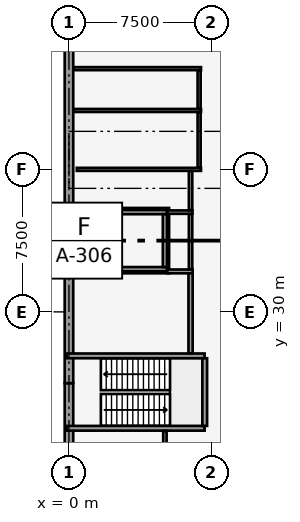
"""IFC4 building model, lengths in metres.
Left out: names, types, materials, properties, quantities, classifications, styles, units other than length and angle.
Written with IfcOpenShell. Run it as: python <this file> out.ifc"""

import sys

from ifc_helpers import new_model, si_unit, direction, frame, frame_2d, origin, origin_2d, place, context, subcontext, project, spatial, rectangle, extrude, element, fill, save


model = new_model("IFC4")
c1 = context("Model", 3, precision=1e-05, world=origin(), true_north=direction((0.0, 1.0)))
c2 = subcontext(c1, "Body", "Model", "MODEL_VIEW")
j1 = project(units=[si_unit("LENGTHUNIT", "METRE"), si_unit("PLANEANGLEUNIT", "RADIAN")], contexts=[c1])
p1 = place(None, origin())
s1 = spatial("IfcSite", under=j1, at=p1, CompositionType="ELEMENT")
p2 = place(p1, origin())
s2 = spatial("IfcBuilding", under=s1, at=p2, CompositionType="ELEMENT")
p3 = place(p2, frame((0.0, 0.0, -4.8)))
s3 = spatial("IfcBuildingStorey", under=s2, at=p3, CompositionType="ELEMENT", Elevation=-4.8)
for number, where, z_axis, x_axis in (
    (1, (0.0, 30.0, 0.0), (0.0, 0.0, 1.0), (1.0, 0.0, 0.0)),
    (2, (0.0, 37.5, 0.0), (0.0, 0.0, 1.0), (1.0, 0.0, 0.0)),
    (3, (7.5, 30.0, 0.0), (0.0, 0.0, 1.0), (1.0, 0.0, 0.0)),
    (4, (7.5, 37.5, 0.0), (0.0, 0.0, 1.0), (1.0, 0.0, 0.0)),
):
    element("IfcColumn", number, at=place(p3, frame(where, z_axis=z_axis, x_axis=x_axis)), inside=s3, PredefinedType="COLUMN", context=c2, shape_type="SweptSolid", body=[
        extrude(rectangle(XDim=0.8, YDim=0.8, at=origin_2d()), origin(), (0.0, 0.0, 1.0), 4.8),
    ])
for number, where, z_axis, x_axis in (
    (5, (0.0, 0.0, 0.0), (0.0, 0.0, 1.0), (0.0, 1.0, 0.0)),
    (6, (0.0, 26.25, 0.0), (0.0, 0.0, 1.0), (0.0, 1.0, 0.0)),
):
    element("IfcWall", number, at=place(p3, frame(where, z_axis=z_axis, x_axis=x_axis)), inside=s3, PredefinedType="USERDEFINED", context=c2, shape_type="SweptSolid", body=[
        extrude(rectangle(XDim=26.25, YDim=0.45, at=frame_2d((13.125, 0.0))), origin(), (0.0, 0.0, 1.0), 4.5),
    ])
p4 = place(p3, frame((-0.12, 23.875, 0.0), z_axis=(0.0, 0.0, 1.0), x_axis=(1.0, 0.0, 0.0)))
e7 = element("IfcWall", 7, at=p4, inside=s3, PredefinedType="SOLIDWALL", context=c2, shape_type="SweptSolid", body=[
    extrude(rectangle(XDim=7.26, YDim=0.25, at=frame_2d((3.63, 0.0))), origin(), (0.0, 0.0, 1.0), 4.5),
])
p5 = place(p3, frame((-0.12, 27.685, 0.0), z_axis=(0.0, 0.0, 1.0), x_axis=(1.0, 0.0, 0.0)))
e8 = element("IfcWall", 8, at=p5, inside=s3, PredefinedType="SOLIDWALL", context=c2, shape_type="SweptSolid", body=[
    extrude(rectangle(XDim=7.26, YDim=0.25, at=frame_2d((3.63, 0.0))), origin(), (0.0, 0.0, 1.0), 4.5),
])
p6 = place(p5, frame((0.45, 0.0, 0.0)))
e9 = element("IfcOpeningElement", 9, at=p6, cuts=e8, PredefinedType="OPENING", context=c2, shape_type="SweptSolid", body=[
    extrude(rectangle(XDim=1.1, YDim=2.15, at=frame_2d((0.55, 1.075))), frame((0.0, 0.135, 0.0), z_axis=(0.0, -1.0, 0.0), x_axis=(1.0, 0.0, 0.0)), (0.0, 0.0, 1.0), 0.27),
])
p7 = place(p3, frame((7.145, 24.0, 0.0), z_axis=(0.0, 0.0, 1.0), x_axis=(0.0, 1.0, 0.0)))
e10 = element("IfcWall", 10, at=p7, inside=s3, PredefinedType="SOLIDWALL", context=c2, shape_type="SweptSolid", body=[
    extrude(rectangle(XDim=3.56, YDim=0.25, at=frame_2d((1.78, 0.0))), origin(), (0.0, 0.0, 1.0), 4.5),
])
p8 = place(p3, frame((2.34, 32.25, 0.0), z_axis=(0.0, 0.0, 1.0), x_axis=(1.0, 0.0, 0.0)))
e11 = element("IfcWall", 11, at=p8, inside=s3, PredefinedType="SOLIDWALL", context=c2, shape_type="SweptSolid", body=[
    extrude(rectangle(XDim=2.82, YDim=0.22, at=frame_2d((1.41, 0.0))), origin(), (0.0, 0.0, 1.0), 4.5),
])
p9 = place(p8, frame((0.86, 0.0, 0.0)))
e12 = element("IfcOpeningElement", 12, at=p9, cuts=e11, PredefinedType="OPENING", context=c2, shape_type="SweptSolid", body=[
    extrude(rectangle(XDim=1.1, YDim=2.15, at=frame_2d((0.55, 1.075))), frame((0.0, 0.12, 0.0), z_axis=(0.0, -1.0, 0.0), x_axis=(1.0, 0.0, 0.0)), (0.0, 0.0, 1.0), 0.24),
])
p10 = place(p3, frame((2.34, 35.25, 0.0), z_axis=(0.0, 0.0, 1.0), x_axis=(1.0, 0.0, 0.0)))
e13 = element("IfcWall", 13, at=p10, inside=s3, PredefinedType="SOLIDWALL", context=c2, shape_type="SweptSolid", body=[
    extrude(rectangle(XDim=2.82, YDim=0.22, at=frame_2d((1.41, 0.0))), origin(), (0.0, 0.0, 1.0), 4.5),
])
for number, where, z_axis, x_axis in (
    (14, (2.45, 32.36, 0.0), (0.0, 0.0, 1.0), (0.0, 1.0, 0.0)),
    (15, (5.05, 32.36, 0.0), (0.0, 0.0, 1.0), (0.0, 1.0, 0.0)),
):
    element("IfcWall", number, at=place(p3, frame(where, z_axis=z_axis, x_axis=x_axis)), inside=s3, PredefinedType="SOLIDWALL", context=c2, shape_type="SweptSolid", body=[
        extrude(rectangle(XDim=2.78, YDim=0.22, at=frame_2d((1.39, 0.0))), origin(), (0.0, 0.0, 1.0), 4.5),
    ])
p11 = place(p3, frame((6.4, 27.82, 0.0), z_axis=(0.0, 0.0, 1.0), x_axis=(0.0, 1.0, 0.0)))
e16 = element("IfcWall", 16, at=p11, inside=s3, PredefinedType="SOLIDWALL", context=c2, shape_type="SweptSolid", body=[
    extrude(rectangle(XDim=4.31, YDim=0.22, at=frame_2d((2.155, 0.0))), origin(), (0.0, 0.0, 1.0), 4.5),
])
p12 = place(p11, frame((0.45, 0.0, 0.0)))
e17 = element("IfcOpeningElement", 17, at=p12, cuts=e16, PredefinedType="OPENING", context=c2, shape_type="SweptSolid", body=[
    extrude(rectangle(XDim=1.1, YDim=2.15, at=frame_2d((0.55, 1.075))), frame((0.0, 0.12, 0.0), z_axis=(0.0, -1.0, 0.0), x_axis=(1.0, 0.0, 0.0)), (0.0, 0.0, 1.0), 0.24),
])
p13 = place(p3, frame((0.24, 32.13, 0.0), z_axis=(0.0, 0.0, 1.0), x_axis=(1.0, 0.0, 0.0)))
e18 = element("IfcWall", 18, at=p13, inside=s3, PredefinedType="PARTITIONING", context=c2, shape_type="SweptSolid", body=[
    extrude(rectangle(XDim=2.085, YDim=0.2, at=frame_2d((1.042, 0.0))), origin(), (0.0, 0.0, 1.0), 4.48),
])
p14 = place(p3, frame((5.175, 32.13, 0.0), z_axis=(0.0, 0.0, 1.0), x_axis=(1.0, 0.0, 0.0)))
e19 = element("IfcWall", 19, at=p14, inside=s3, PredefinedType="PARTITIONING", context=c2, shape_type="SweptSolid", body=[
    extrude(rectangle(XDim=1.335, YDim=0.2, at=frame_2d((0.667, 0.0))), origin(), (0.0, 0.0, 1.0), 4.48),
])
p15 = place(p3, frame((5.05, 20.274, 0.0), z_axis=(0.0, 0.0, 1.0), x_axis=(0.0, 1.0, 0.0)))
e20 = element("IfcWall", 20, at=p15, inside=s3, PredefinedType="PARTITIONING", context=c2, shape_type="SweptSolid", body=[
    extrude(rectangle(XDim=3.462, YDim=0.18, at=frame_2d((1.731, 0.0))), origin(), (0.0, 0.0, 1.0), 3.67),
])
p16 = place(p3, frame((0.239, 35.25, 0.0), z_axis=(0.0, 0.0, 1.0), x_axis=(1.0, 0.0, 0.0)))
e21 = element("IfcWall", 21, at=p16, inside=s3, PredefinedType="PARTITIONING", context=c2, shape_type="SweptSolid", body=[
    extrude(rectangle(XDim=2.101, YDim=0.18, at=frame_2d((1.051, 0.0))), origin(), (0.0, 0.0, 1.0), 3.87),
])
p17 = place(p3, frame((5.16, 35.25, 0.0), z_axis=(0.0, 0.0, 1.0), x_axis=(1.0, 0.0, 0.0)))
e22 = element("IfcWall", 22, at=p17, inside=s3, PredefinedType="PARTITIONING", context=c2, shape_type="SweptSolid", body=[
    extrude(rectangle(XDim=1.34, YDim=0.18, at=frame_2d((0.67, 0.0))), origin(), (0.0, 0.0, 1.0), 3.87),
])
p18 = place(p3, frame((0.414, 37.5, 0.0), z_axis=(0.0, 0.0, 1.0), x_axis=(1.0, 0.0, 0.0)))
e23 = element("IfcWall", 23, at=p18, inside=s3, PredefinedType="PARTITIONING", context=c2, shape_type="SweptSolid", body=[
    extrude(rectangle(XDim=6.536, YDim=0.16, at=frame_2d((3.268, 0.0))), origin(), (0.0, 0.0, 1.0), 3.42),
])
p19 = place(p3, frame((6.4, 32.244, 0.0), z_axis=(0.0, 0.0, 1.0), x_axis=(0.0, 1.0, 0.0)))
e24 = element("IfcWall", 24, at=p19, inside=s3, PredefinedType="PARTITIONING", context=c2, shape_type="SweptSolid", body=[
    extrude(rectangle(XDim=2.902, YDim=0.18, at=frame_2d((1.451, 0.0))), origin(), (0.0, 0.0, 1.0), 3.87),
])
p20 = place(p3, frame((6.4, 35.354, 0.0), z_axis=(0.0, 0.0, 1.0), x_axis=(0.0, 1.0, 0.0)))
e25 = element("IfcWall", 25, at=p20, inside=s3, PredefinedType="PARTITIONING", context=c2, shape_type="SweptSolid", body=[
    extrude(rectangle(XDim=2.052, YDim=0.18, at=frame_2d((1.026, 0.0))), origin(), (0.0, 0.0, 1.0), 3.67),
])
p21 = place(p20, frame((0.546, 0.0, 0.0)))
e26 = element("IfcOpeningElement", 26, at=p21, cuts=e25, PredefinedType="OPENING", context=c2, shape_type="SweptSolid", body=[
    extrude(rectangle(XDim=0.9, YDim=2.1, at=frame_2d((0.45, 1.05))), frame((0.0, 0.1, 0.0), z_axis=(0.0, -1.0, 0.0), x_axis=(1.0, 0.0, 0.0)), (0.0, 0.0, 1.0), 0.2),
])
for number, where, z_axis, x_axis in (
    (27, (0.239, 40.6, 0.0), (0.0, 0.0, 1.0), (1.0, 0.0, 0.0)),
    (28, (0.239, 42.8, 0.0), (0.0, 0.0, 1.0), (1.0, 0.0, 0.0)),
):
    element("IfcWall", number, at=place(p3, frame(where, z_axis=z_axis, x_axis=x_axis)), inside=s3, PredefinedType="PARTITIONING", context=c2, shape_type="SweptSolid", body=[
        extrude(rectangle(XDim=6.711, YDim=0.16, at=frame_2d((3.355, 0.0))), origin(), (0.0, 0.0, 1.0), 3.87),
    ])
p22 = place(p3, frame((6.85, 37.594, 0.0), z_axis=(0.0, 0.0, 1.0), x_axis=(0.0, 1.0, 0.0)))
e29 = element("IfcWall", 29, at=p22, inside=s3, PredefinedType="PARTITIONING", context=c2, shape_type="SweptSolid", body=[
    extrude(rectangle(XDim=2.912, YDim=0.16, at=frame_2d((1.456, 0.0))), origin(), (0.0, 0.0, 1.0), 3.42),
])
p23 = place(p22, frame((0.981, 0.0, 0.0)))
e30 = element("IfcOpeningElement", 30, at=p23, cuts=e29, PredefinedType="OPENING", context=c2, shape_type="SweptSolid", body=[
    extrude(rectangle(XDim=0.95, YDim=2.1, at=frame_2d((0.475, 1.05))), frame((0.0, 0.09, 0.0), z_axis=(0.0, -1.0, 0.0), x_axis=(1.0, 0.0, 0.0)), (0.0, 0.0, 1.0), 0.18),
])
p24 = place(p3, frame((6.85, 40.694, 0.0), z_axis=(0.0, 0.0, 1.0), x_axis=(0.0, 1.0, 0.0)))
e31 = element("IfcWall", 31, at=p24, inside=s3, PredefinedType="PARTITIONING", context=c2, shape_type="SweptSolid", body=[
    extrude(rectangle(XDim=2.012, YDim=0.16, at=frame_2d((1.006, 0.0))), origin(), (0.0, 0.0, 1.0), 3.87),
])
p25 = place(p24, frame((0.556, 0.0, 0.0)))
e32 = element("IfcOpeningElement", 32, at=p25, cuts=e31, PredefinedType="OPENING", context=c2, shape_type="SweptSolid", body=[
    extrude(rectangle(XDim=0.9, YDim=2.1, at=frame_2d((0.45, 1.05))), frame((0.0, 0.09, 0.0), z_axis=(0.0, -1.0, 0.0), x_axis=(1.0, 0.0, 0.0)), (0.0, 0.0, 1.0), 0.18),
])
p26 = place(p6, origin())
e33 = element("IfcDoor", 33, at=p26, inside=s3, OperationType="SINGLE_SWING_LEFT", PredefinedType="DOOR", context=c2, shape_type="SweptSolid", body=[
    extrude(rectangle(XDim=1.1, YDim=2.15, at=frame_2d((0.55, 1.075))), frame((0.0, 0.025, 0.0), z_axis=(0.0, -1.0, 0.0), x_axis=(1.0, 0.0, 0.0)), (0.0, 0.0, 1.0), 0.05),
])
fill(e9, e33)
p27 = place(p9, origin())
e34 = element("IfcDoor", 34, at=p27, inside=s3, OperationType="SLIDING_TO_LEFT", PredefinedType="DOOR", context=c2, shape_type="SweptSolid", body=[
    extrude(rectangle(XDim=1.1, YDim=2.15, at=frame_2d((0.55, 1.075))), frame((0.0, 0.025, 0.0), z_axis=(0.0, -1.0, 0.0), x_axis=(1.0, 0.0, 0.0)), (0.0, 0.0, 1.0), 0.05),
])
fill(e12, e34)
p28 = place(p12, origin())
e35 = element("IfcDoor", 35, at=p28, inside=s3, OperationType="SINGLE_SWING_LEFT", PredefinedType="DOOR", context=c2, shape_type="SweptSolid", body=[
    extrude(rectangle(XDim=1.1, YDim=2.15, at=frame_2d((0.55, 1.075))), frame((0.0, 0.025, 0.0), z_axis=(0.0, -1.0, 0.0), x_axis=(1.0, 0.0, 0.0)), (0.0, 0.0, 1.0), 0.05),
])
fill(e17, e35)
p29 = place(p21, origin())
e36 = element("IfcDoor", 36, at=p29, inside=s3, OperationType="SINGLE_SWING_RIGHT", PredefinedType="DOOR", context=c2, shape_type="SweptSolid", body=[
    extrude(rectangle(XDim=0.9, YDim=2.1, at=frame_2d((0.45, 1.05))), frame((0.0, 0.025, 0.0), z_axis=(0.0, -1.0, 0.0), x_axis=(1.0, 0.0, 0.0)), (0.0, 0.0, 1.0), 0.05),
])
fill(e26, e36)
p30 = place(p23, origin())
e37 = element("IfcDoor", 37, at=p30, inside=s3, OperationType="SINGLE_SWING_LEFT", PredefinedType="DOOR", context=c2, shape_type="SweptSolid", body=[
    extrude(rectangle(XDim=0.95, YDim=2.1, at=frame_2d((0.475, 1.05))), frame((0.0, 0.025, 0.0), z_axis=(0.0, -1.0, 0.0), x_axis=(1.0, 0.0, 0.0)), (0.0, 0.0, 1.0), 0.05),
])
fill(e30, e37)
p31 = place(p25, origin())
e38 = element("IfcDoor", 38, at=p31, inside=s3, OperationType="SINGLE_SWING_RIGHT", PredefinedType="DOOR", context=c2, shape_type="SweptSolid", body=[
    extrude(rectangle(XDim=0.9, YDim=2.1, at=frame_2d((0.45, 1.05))), frame((0.0, 0.025, 0.0), z_axis=(0.0, -1.0, 0.0), x_axis=(1.0, 0.0, 0.0)), (0.0, 0.0, 1.0), 0.05),
])
fill(e32, e38)
save(model, sys.argv[1])
